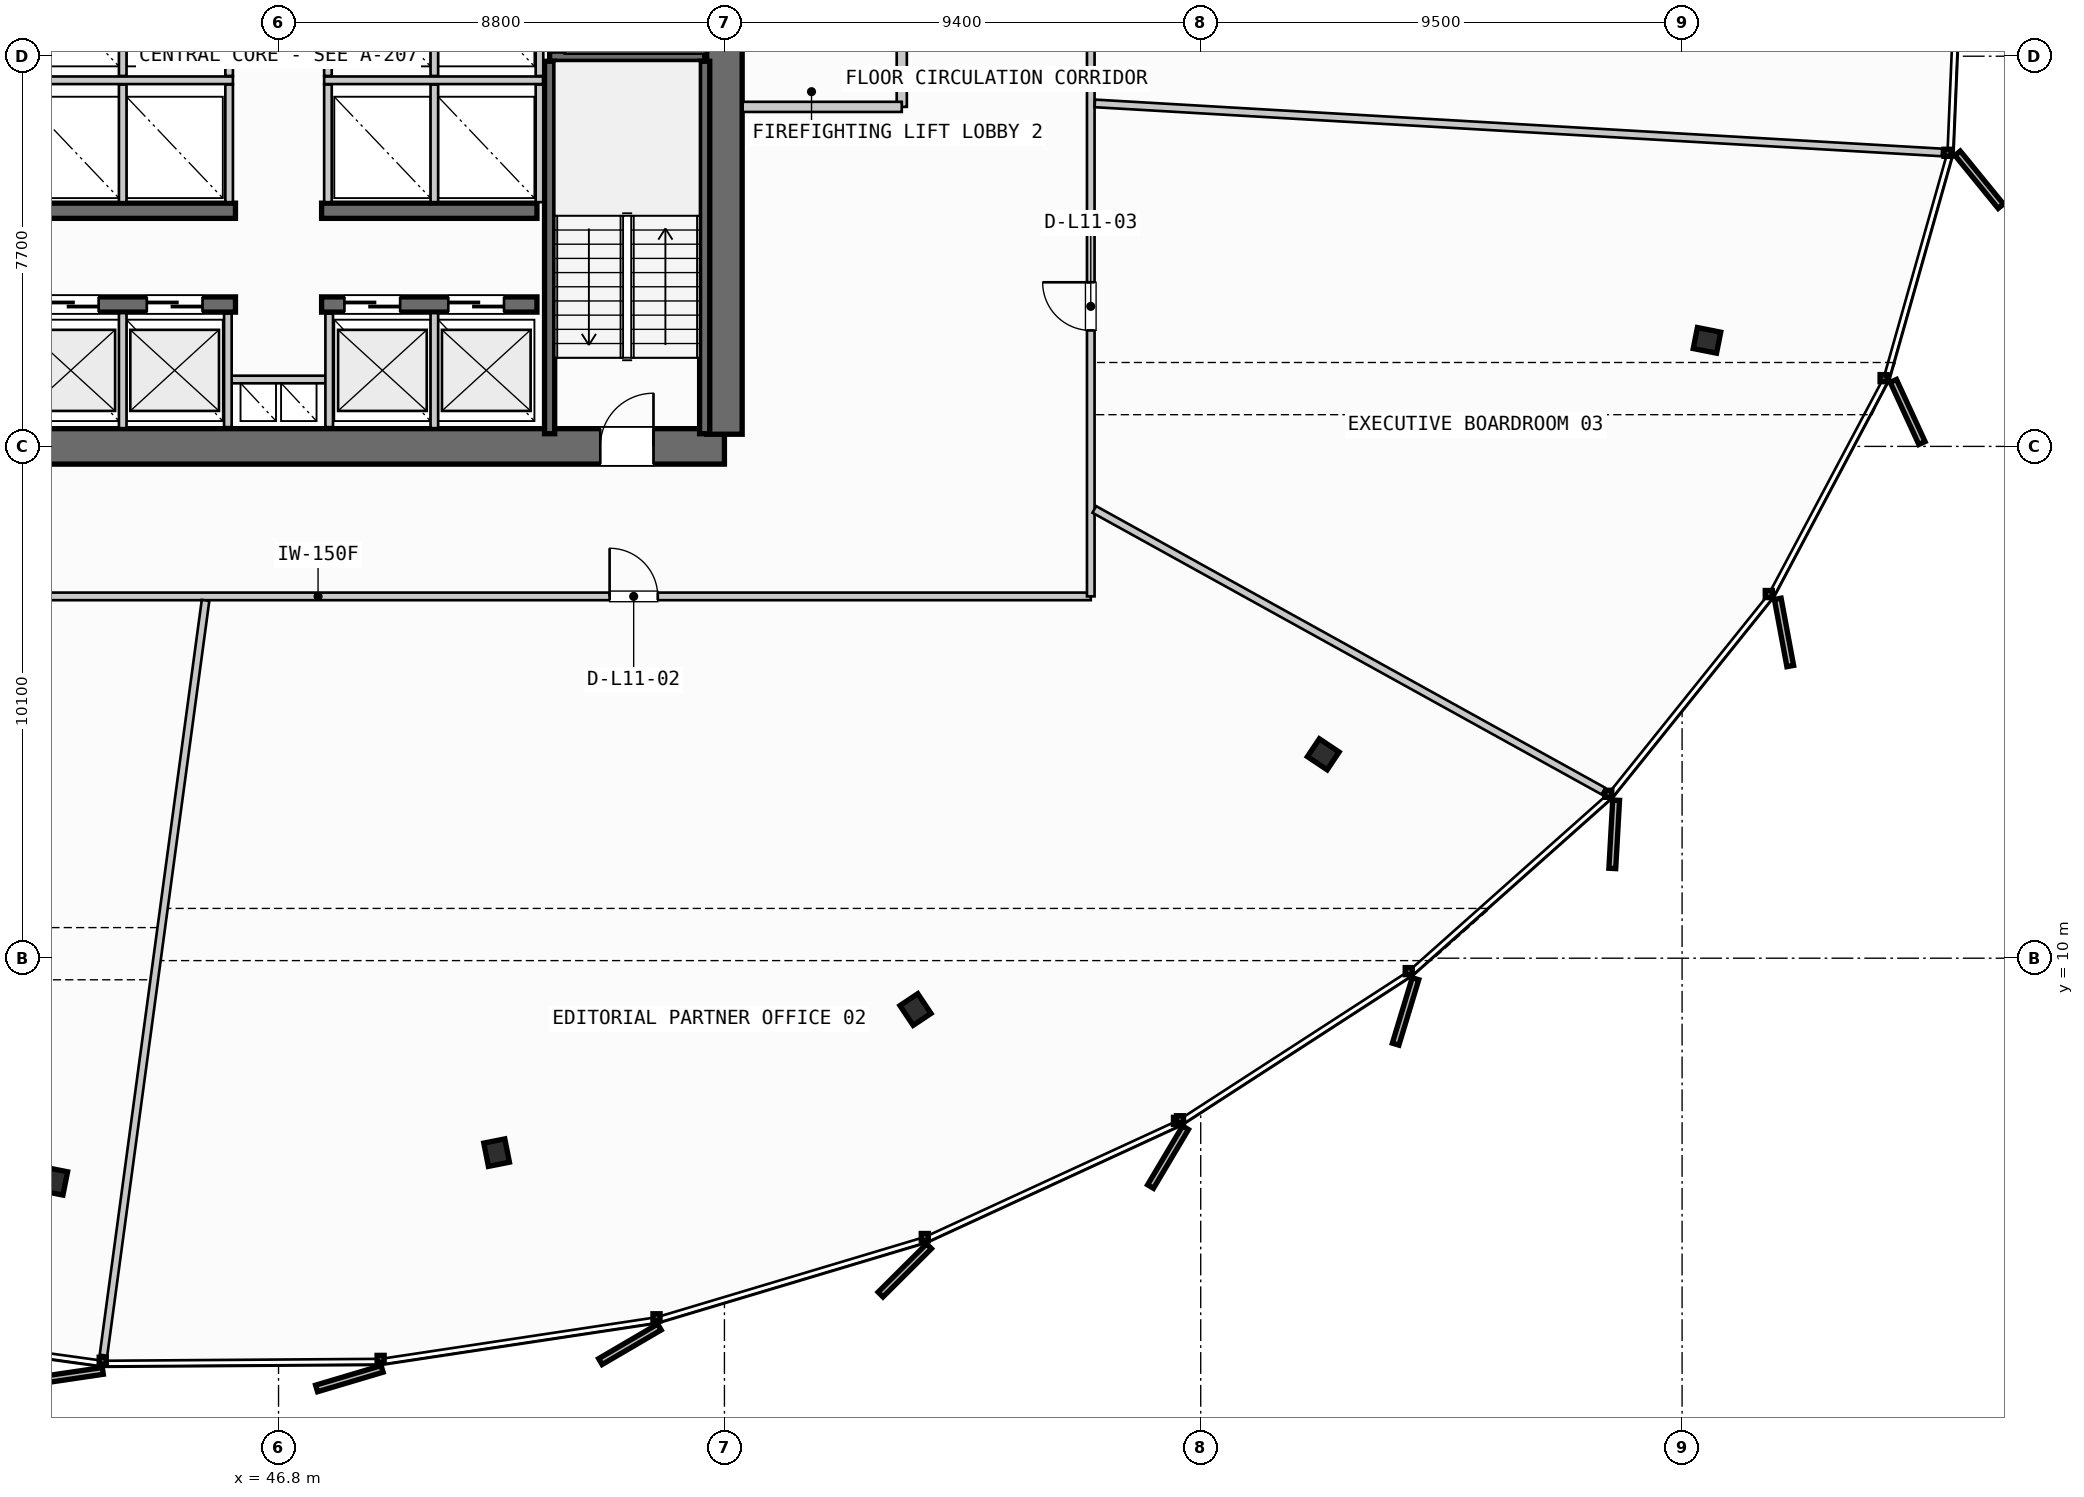
"""IFC4 building model, lengths in metres.
Left out: names, types, materials, properties, quantities, classifications, styles, units other than length and angle.
Written with IfcOpenShell. Run it as: python <this file> out.ifc"""

import sys

from ifc_helpers import new_model, si_unit, direction, frame, frame_2d, origin, origin_2d, place, context, subcontext, project, spatial, rectangle, i_section, extrude, source, transform, mapped, element, fill, save


model = new_model("IFC4")
c1 = context("Model", 3, precision=1e-05, world=origin(), true_north=direction((0.0, 1.0)))
c2 = subcontext(c1, "Body", "Model", "MODEL_VIEW")
j1 = project(units=[si_unit("LENGTHUNIT", "METRE"), si_unit("PLANEANGLEUNIT", "RADIAN")], contexts=[c1])
p1 = place(None, origin())
s1 = spatial("IfcSite", under=j1, at=p1, CompositionType="ELEMENT")
p2 = place(p1, origin())
s2 = spatial("IfcBuilding", under=s1, at=p2, CompositionType="ELEMENT")
p3 = place(p2, frame((0.0, 0.0, 48.6)))
s3 = spatial("IfcBuildingStorey", under=s2, at=p3, CompositionType="ELEMENT", Elevation=48.6)
p4 = place(p3, frame((38.0, 20.1, 0.0), z_axis=(0.0, 0.0, 1.0), x_axis=(1.0, 0.0, 0.0)))
e1 = element("IfcWall", 1, at=p4, inside=s3, PredefinedType="SHEAR", context=c2, shape_type="SweptSolid", body=[
    extrude(rectangle(XDim=17.6, YDim=0.7, at=frame_2d((8.8, 0.0))), origin(), (0.0, 0.0, 1.0), 3.55),
])
p5 = place(p4, frame((1.4, 0.0, 0.0)))
e2 = element("IfcOpeningElement", 2, at=p5, cuts=e1, PredefinedType="OPENING", context=c2, shape_type="SweptSolid", body=[
    extrude(rectangle(XDim=1.05, YDim=2.15, at=frame_2d((0.525, 1.075))), frame((0.0, 0.36, 0.0), z_axis=(0.0, -1.0, 0.0), x_axis=(1.0, 0.0, 0.0)), (0.0, 0.0, 1.0), 0.72),
])
p6 = place(p4, frame((15.15, 0.0, 0.0)))
e3 = element("IfcOpeningElement", 3, at=p6, cuts=e1, PredefinedType="OPENING", context=c2, shape_type="SweptSolid", body=[
    extrude(rectangle(XDim=1.05, YDim=2.15, at=frame_2d((0.525, 1.075))), frame((0.0, 0.36, 0.0), z_axis=(0.0, -1.0, 0.0), x_axis=(1.0, 0.0, 0.0)), (0.0, 0.0, 1.0), 0.72),
])
p7 = place(p3, frame((55.6, 20.34, 0.0), z_axis=(0.0, 0.0, 1.0), x_axis=(0.0, 1.0, 0.0)))
e4 = element("IfcWall", 4, at=p7, inside=s3, PredefinedType="SHEAR", context=c2, shape_type="SweptSolid", body=[
    extrude(rectangle(XDim=14.92, YDim=0.7, at=frame_2d((7.46, 0.0))), origin(), (0.0, 0.0, 1.0), 3.55),
])
p8 = place(p7, frame((12.71, 0.0, 0.0)))
e5 = element("IfcOpeningElement", 5, at=p8, cuts=e4, PredefinedType="OPENING", context=c2, shape_type="SweptSolid", body=[
    extrude(rectangle(XDim=1.05, YDim=2.15, at=frame_2d((0.525, 1.075))), frame((0.0, 0.36, 0.0), z_axis=(0.0, -1.0, 0.0), x_axis=(1.0, 0.0, 0.0)), (0.0, 0.0, 1.0), 0.72),
])
p9 = place(p7, frame((8.61, 0.0, 0.0)))
e6 = element("IfcOpeningElement", 6, at=p9, cuts=e4, PredefinedType="OPENING", context=c2, shape_type="SweptSolid", body=[
    extrude(rectangle(XDim=1.1, YDim=2.2, at=frame_2d((0.55, 1.1))), frame((0.0, 0.36, 0.0), z_axis=(0.0, -1.0, 0.0), x_axis=(1.0, 0.0, 0.0)), (0.0, 0.0, 1.0), 0.72),
])
p10 = place(p3, frame((41.7, 22.9, 0.0), z_axis=(0.0, 0.0, 1.0), x_axis=(1.0, 0.0, 0.0)))
e7 = element("IfcWall", 7, at=p10, inside=s3, PredefinedType="SHEAR", context=c2, shape_type="SweptSolid", body=[
    extrude(rectangle(XDim=4.25, YDim=0.3, at=frame_2d((2.125, 0.0))), origin(), (0.0, 0.0, 1.0), 3.55),
])
p11 = place(p10, frame((0.45, 0.0, 0.0)))
e8 = element("IfcOpeningElement", 8, at=p11, cuts=e7, PredefinedType="OPENING", context=c2, shape_type="SweptSolid", body=[
    extrude(rectangle(XDim=1.1, YDim=2.2, at=frame_2d((0.55, 1.1))), frame((0.0, 0.16, 0.0), z_axis=(0.0, -1.0, 0.0), x_axis=(1.0, 0.0, 0.0)), (0.0, 0.0, 1.0), 0.32),
])
p12 = place(p10, frame((2.5, 0.0, 0.0)))
e9 = element("IfcOpeningElement", 9, at=p12, cuts=e7, PredefinedType="OPENING", context=c2, shape_type="SweptSolid", body=[
    extrude(rectangle(XDim=1.1, YDim=2.2, at=frame_2d((0.55, 1.1))), frame((0.0, 0.16, 0.0), z_axis=(0.0, -1.0, 0.0), x_axis=(1.0, 0.0, 0.0)), (0.0, 0.0, 1.0), 0.32),
])
p13 = place(p3, frame((47.65, 22.9, 0.0), z_axis=(0.0, 0.0, 1.0), x_axis=(1.0, 0.0, 0.0)))
e10 = element("IfcWall", 10, at=p13, inside=s3, PredefinedType="SHEAR", context=c2, shape_type="SweptSolid", body=[
    extrude(rectangle(XDim=4.25, YDim=0.3, at=frame_2d((2.125, 0.0))), origin(), (0.0, 0.0, 1.0), 3.55),
])
p14 = place(p13, frame((0.45, 0.0, 0.0)))
e11 = element("IfcOpeningElement", 11, at=p14, cuts=e10, PredefinedType="OPENING", context=c2, shape_type="SweptSolid", body=[
    extrude(rectangle(XDim=1.1, YDim=2.2, at=frame_2d((0.55, 1.1))), frame((0.0, 0.16, 0.0), z_axis=(0.0, -1.0, 0.0), x_axis=(1.0, 0.0, 0.0)), (0.0, 0.0, 1.0), 0.32),
])
p15 = place(p13, frame((2.5, 0.0, 0.0)))
e12 = element("IfcOpeningElement", 12, at=p15, cuts=e10, PredefinedType="OPENING", context=c2, shape_type="SweptSolid", body=[
    extrude(rectangle(XDim=1.1, YDim=2.2, at=frame_2d((0.55, 1.1))), frame((0.0, 0.16, 0.0), z_axis=(0.0, -1.0, 0.0), x_axis=(1.0, 0.0, 0.0)), (0.0, 0.0, 1.0), 0.32),
])
for number, where, z_axis, x_axis in (
    (13, (41.7, 24.75, 0.0), (0.0, 0.0, 1.0), (1.0, 0.0, 0.0)),
    (14, (47.65, 24.75, 0.0), (0.0, 0.0, 1.0), (1.0, 0.0, 0.0)),
):
    element("IfcWall", number, at=place(p3, frame(where, z_axis=z_axis, x_axis=x_axis)), inside=s3, PredefinedType="SHEAR", context=c2, shape_type="SweptSolid", body=[
        extrude(rectangle(XDim=4.25, YDim=0.3, at=frame_2d((2.125, 0.0))), origin(), (0.0, 0.0, 1.0), 3.55),
    ])
m1 = source(origin(), c2, "Body", "SweptSolid", [
    extrude(i_section(OverallWidth=0.423, OverallDepth=0.469, WebThickness=0.051, FlangeThickness=0.081, FilletRadius=0.015, at=origin_2d()), origin(), (0.0, 0.0, 1.0), 3.55),
])
for number, where, z_axis, x_axis in (
    (15, (42.383, 5.596, 0.0), (0.0, 0.0, 1.0), (-0.195, -0.981, 0.0)),
    (16, (51.104, 6.163, 0.0), (0.0, 0.0, 1.0), (0.195, -0.981, 0.0)),
    (17, (59.37, 8.987, 0.0), (0.0, 0.0, 1.0), (0.556, -0.831, 0.0)),
    (18, (67.418, 14.023, 0.0), (0.0, 0.0, 1.0), (0.831, -0.556, 0.0)),
    (19, (74.991, 22.192, 0.0), (0.0, 0.0, 1.0), (0.981, -0.195, 0.0)),
):
    element("IfcColumn", number, at=place(p3, frame(where, z_axis=z_axis, x_axis=x_axis)), inside=s3, PredefinedType="COLUMN", context=c2, shape_type="MappedRepresentation", body=[
        mapped(m1, transform((0.0, 0.0, 0.0), scale=1.0)),
    ])
p16 = place(p3, frame((52.15, 27.8, 0.0), z_axis=(0.0, 0.0, 1.0), x_axis=(1.0, 0.0, 0.0)))
e20 = element("IfcWall", 20, at=p16, inside=s3, PredefinedType="SHEAR", context=c2, shape_type="SweptSolid", body=[
    extrude(rectangle(XDim=3.06, YDim=0.2, at=frame_2d((1.53, 0.0))), origin(), (0.0, 0.0, 1.0), 3.55),
])
for number, where, z_axis, x_axis in (
    (21, (55.21, 27.7, 0.0), (0.0, 0.0, 1.0), (0.0, -1.0, 0.0)),
    (22, (52.15, 20.35, 0.0), (0.0, 0.0, 1.0), (0.0, 1.0, 0.0)),
):
    element("IfcWall", number, at=place(p3, frame(where, z_axis=z_axis, x_axis=x_axis)), inside=s3, PredefinedType="SHEAR", context=c2, shape_type="SweptSolid", body=[
        extrude(rectangle(XDim=7.35, YDim=0.2, at=frame_2d((3.675, 0.0))), origin(), (0.0, 0.0, 1.0), 3.55),
    ])
p17 = place(p3, frame((45.8, 21.42, 0.0), z_axis=(0.0, 0.0, 1.0), x_axis=(1.0, 0.0, 0.0)))
e23 = element("IfcWall", 23, at=p17, inside=s3, PredefinedType="PARTITIONING", context=c2, shape_type="SweptSolid", body=[
    extrude(rectangle(XDim=2.0, YDim=0.15, at=frame_2d((1.0, 0.0))), origin(), (0.0, 0.0, 1.0), 2.785),
])
for number, where, z_axis, x_axis in (
    (24, (45.8, 20.48, 0.0), (0.0, 0.0, 1.0), (0.0, 1.0, 0.0)),
    (25, (47.8, 20.48, 0.0), (0.0, 0.0, 1.0), (0.0, 1.0, 0.0)),
):
    element("IfcWall", number, at=place(p3, frame(where, z_axis=z_axis, x_axis=x_axis)), inside=s3, PredefinedType="PARTITIONING", context=c2, shape_type="SweptSolid", body=[
        extrude(rectangle(XDim=2.24, YDim=0.15, at=frame_2d((1.12, 0.0))), origin(), (0.0, 0.0, 1.0), 2.785),
    ])
p18 = place(p3, frame((52.45, 27.95, 0.0), z_axis=(0.0, 0.0, 1.0), x_axis=(1.0, 0.0, 0.0)))
e26 = element("IfcWall", 26, at=p18, inside=s3, PredefinedType="PARTITIONING", context=c2, shape_type="SweptSolid", body=[
    extrude(rectangle(XDim=2.79, YDim=0.2, at=frame_2d((1.395, 0.0))), origin(), (0.0, 0.0, 1.0), 2.785),
])
p19 = place(p3, frame((59.1, 26.8, 0.0), z_axis=(0.0, 0.0, 1.0), x_axis=(0.0, 1.0, 0.0)))
e27 = element("IfcWall", 27, at=p19, inside=s3, PredefinedType="PARTITIONING", context=c2, shape_type="SweptSolid", body=[
    extrude(rectangle(XDim=4.4, YDim=0.2, at=frame_2d((2.2, 0.0))), origin(), (0.0, 0.0, 1.0), 2.785),
])
p20 = place(p19, frame((1.65, 0.0, 0.0)))
e28 = element("IfcOpeningElement", 28, at=p20, cuts=e27, PredefinedType="OPENING", context=c2, shape_type="SweptSolid", body=[
    extrude(rectangle(XDim=1.05, YDim=2.15, at=frame_2d((0.525, 1.075))), frame((0.0, 0.11, 0.0), z_axis=(0.0, -1.0, 0.0), x_axis=(1.0, 0.0, 0.0)), (0.0, 0.0, 1.0), 0.22),
])
p21 = place(p3, frame((55.96, 26.8, 0.0), z_axis=(0.0, 0.0, 1.0), x_axis=(1.0, 0.0, 0.0)))
e29 = element("IfcWall", 29, at=p21, inside=s3, PredefinedType="PARTITIONING", context=c2, shape_type="SweptSolid", body=[
    extrude(rectangle(XDim=3.14, YDim=0.2, at=frame_2d((1.57, 0.0))), origin(), (0.0, 0.0, 1.0), 2.785),
])
for number, where, z_axis, x_axis in (
    (30, (43.725, 20.46, 0.0), (0.0, 0.0, 1.0), (0.0, 1.0, 0.0)),
    (31, (49.875, 20.46, 0.0), (0.0, 0.0, 1.0), (0.0, 1.0, 0.0)),
):
    element("IfcWall", number, at=place(p3, frame(where, z_axis=z_axis, x_axis=x_axis)), inside=s3, PredefinedType="PARTITIONING", context=c2, shape_type="SweptSolid", body=[
        extrude(rectangle(XDim=2.27, YDim=0.15, at=frame_2d((1.135, 0.0))), origin(), (0.0, 0.0, 1.0), 2.785),
    ])
p22 = place(p3, frame((41.58, 27.325, 0.0), z_axis=(0.0, 0.0, 1.0), x_axis=(1.0, 0.0, 0.0)))
e32 = element("IfcWall", 32, at=p22, inside=s3, PredefinedType="PARTITIONING", context=c2, shape_type="SweptSolid", body=[
    extrude(rectangle(XDim=4.32, YDim=0.15, at=frame_2d((2.16, 0.0))), origin(), (0.0, 0.0, 1.0), 2.785),
])
p23 = place(p3, frame((47.7, 27.325, 0.0), z_axis=(0.0, 0.0, 1.0), x_axis=(1.0, 0.0, 0.0)))
e33 = element("IfcWall", 33, at=p23, inside=s3, PredefinedType="PARTITIONING", context=c2, shape_type="SweptSolid", body=[
    extrude(rectangle(XDim=4.32, YDim=0.15, at=frame_2d((2.16, 0.0))), origin(), (0.0, 0.0, 1.0), 2.785),
])
for number, where, z_axis, x_axis in (
    (34, (43.725, 24.92, 0.0), (0.0, 0.0, 1.0), (0.0, 1.0, 0.0)),
    (35, (45.825, 24.92, 0.0), (0.0, 0.0, 1.0), (0.0, 1.0, 0.0)),
    (36, (47.775, 24.92, 0.0), (0.0, 0.0, 1.0), (0.0, 1.0, 0.0)),
    (37, (49.875, 24.92, 0.0), (0.0, 0.0, 1.0), (0.0, 1.0, 0.0)),
    (38, (51.95, 24.92, 0.0), (0.0, 0.0, 1.0), (0.0, 1.0, 0.0)),
):
    element("IfcWall", number, at=place(p3, frame(where, z_axis=z_axis, x_axis=x_axis)), inside=s3, PredefinedType="PARTITIONING", context=c2, shape_type="SweptSolid", body=[
        extrude(rectangle(XDim=2.32, YDim=0.15, at=frame_2d((1.16, 0.0))), origin(), (0.0, 0.0, 1.0), 2.785),
    ])
for number, where, z_axis, x_axis in (
    (39, (43.725, 27.41, 0.0), (0.0, 0.0, 1.0), (0.0, 1.0, 0.0)),
    (40, (45.825, 27.41, 0.0), (0.0, 0.0, 1.0), (0.0, 1.0, 0.0)),
    (41, (47.775, 27.41, 0.0), (0.0, 0.0, 1.0), (0.0, 1.0, 0.0)),
    (42, (49.875, 27.41, 0.0), (0.0, 0.0, 1.0), (0.0, 1.0, 0.0)),
    (43, (51.95, 27.41, 0.0), (0.0, 0.0, 1.0), (0.0, 1.0, 0.0)),
):
    element("IfcWall", number, at=place(p3, frame(where, z_axis=z_axis, x_axis=x_axis)), inside=s3, PredefinedType="PARTITIONING", context=c2, shape_type="SweptSolid", body=[
        extrude(rectangle(XDim=2.27, YDim=0.15, at=frame_2d((1.135, 0.0))), origin(), (0.0, 0.0, 1.0), 2.785),
    ])
p24 = place(p3, frame((32.33, 17.14, 0.0), z_axis=(0.0, 0.0, 1.0), x_axis=(1.0, 0.0, 0.0)))
e44 = element("IfcWall", 44, at=p24, inside=s3, PredefinedType="PARTITIONING", context=c2, shape_type="SweptSolid", body=[
    extrude(rectangle(XDim=30.5, YDim=0.15, at=frame_2d((15.25, 0.0))), origin(), (0.0, 0.0, 1.0), 2.785),
])
p25 = place(p24, frame((6.621, 0.0, 0.0)))
e45 = element("IfcOpeningElement", 45, at=p25, cuts=e44, PredefinedType="OPENING", context=c2, shape_type="SweptSolid", body=[
    extrude(rectangle(XDim=0.95, YDim=2.15, at=frame_2d((0.475, 1.075))), frame((0.0, 0.085, 0.0), z_axis=(0.0, -1.0, 0.0), x_axis=(1.0, 0.0, 0.0)), (0.0, 0.0, 1.0), 0.17),
])
p26 = place(p24, frame((21.004, 0.0, 0.0)))
e46 = element("IfcOpeningElement", 46, at=p26, cuts=e44, PredefinedType="OPENING", context=c2, shape_type="SweptSolid", body=[
    extrude(rectangle(XDim=0.95, YDim=2.15, at=frame_2d((0.475, 1.075))), frame((0.0, 0.085, 0.0), z_axis=(0.0, -1.0, 0.0), x_axis=(1.0, 0.0, 0.0)), (0.0, 0.0, 1.0), 0.17),
])
p27 = place(p3, frame((62.83, 17.14, 0.0), z_axis=(0.0, 0.0, 1.0), x_axis=(0.0, 1.0, 0.0)))
e47 = element("IfcWall", 47, at=p27, inside=s3, PredefinedType="PARTITIONING", context=c2, shape_type="SweptSolid", body=[
    extrude(rectangle(XDim=20.48, YDim=0.15, at=frame_2d((10.24, 0.0))), origin(), (0.0, 0.0, 1.0), 2.785),
])
p28 = place(p27, frame((5.249, 0.0, 0.0)))
e48 = element("IfcOpeningElement", 48, at=p28, cuts=e47, PredefinedType="OPENING", context=c2, shape_type="SweptSolid", body=[
    extrude(rectangle(XDim=0.95, YDim=2.15, at=frame_2d((0.475, 1.075))), frame((0.0, 0.085, 0.0), z_axis=(0.0, -1.0, 0.0), x_axis=(1.0, 0.0, 0.0)), (0.0, 0.0, 1.0), 0.17),
])
p29 = place(p27, frame((14.161, 0.0, 0.0)))
e49 = element("IfcOpeningElement", 49, at=p29, cuts=e47, PredefinedType="OPENING", context=c2, shape_type="SweptSolid", body=[
    extrude(rectangle(XDim=0.95, YDim=2.15, at=frame_2d((0.475, 1.075))), frame((0.0, 0.085, 0.0), z_axis=(0.0, -1.0, 0.0), x_axis=(1.0, 0.0, 0.0)), (0.0, 0.0, 1.0), 0.17),
])
p30 = place(p3, frame((45.36, 17.061, 0.0), z_axis=(0.0, 0.0, 1.0), x_axis=(-0.134025236221, -0.990977919056, 0.0)))
e50 = element("IfcWall", 50, at=p30, inside=s3, PredefinedType="PARTITIONING", context=c2, shape_type="SweptSolid", body=[
    extrude(rectangle(XDim=15.032, YDim=0.15, at=frame_2d((7.516, 0.0))), origin(), (0.0, 0.0, 1.0), 2.785),
])
p31 = place(p3, frame((62.9, 18.856, 0.0), z_axis=(0.0, 0.0, 1.0), x_axis=(0.875005487699, -0.484112999719, 0.0)))
e51 = element("IfcWall", 51, at=p31, inside=s3, PredefinedType="PARTITIONING", context=c2, shape_type="SweptSolid", body=[
    extrude(rectangle(XDim=11.481, YDim=0.15, at=frame_2d((5.741, 0.0))), origin(), (0.0, 0.0, 1.0), 2.785),
])
p32 = place(p3, frame((62.91, 26.869, 0.0), z_axis=(0.0, 0.0, 1.0), x_axis=(0.998327003438, -0.057820361518, 0.0)))
e52 = element("IfcWall", 52, at=p32, inside=s3, PredefinedType="PARTITIONING", context=c2, shape_type="SweptSolid", body=[
    extrude(rectangle(XDim=16.746, YDim=0.15, at=frame_2d((8.373, 0.0))), origin(), (0.0, 0.0, 1.0), 2.785),
])
m2 = source(origin(), c2, "Body", "SweptSolid", [
    extrude(rectangle(XDim=1.05, YDim=2.15, at=frame_2d((0.525, 1.075))), frame((0.0, 0.025, 0.0), z_axis=(0.0, -1.0, 0.0), x_axis=(1.0, 0.0, 0.0)), (0.0, 0.0, 1.0), 0.05),
])
p33 = place(p6, origin())
e53 = element("IfcDoor", 53, at=p33, inside=s3, OperationType="SINGLE_SWING_RIGHT", PredefinedType="DOOR", context=c2, shape_type="MappedRepresentation", body=[
    mapped(m2, transform((0.0, 0.0, 0.0), scale=1.0)),
])
fill(e3, e53)
m3 = source(origin(), c2, "Body", "SweptSolid", [
    extrude(rectangle(XDim=1.1, YDim=2.2, at=frame_2d((0.55, 1.1))), frame((0.0, 0.025, 0.0), z_axis=(0.0, -1.0, 0.0), x_axis=(1.0, 0.0, 0.0)), (0.0, 0.0, 1.0), 0.05),
])
p34 = place(p11, origin())
e54 = element("IfcDoor", 54, at=p34, inside=s3, OperationType="SLIDING_TO_LEFT", PredefinedType="DOOR", context=c2, shape_type="MappedRepresentation", body=[
    mapped(m3, transform((0.0, 0.0, 0.0), scale=1.0)),
])
fill(e8, e54)
p35 = place(p12, origin())
e55 = element("IfcDoor", 55, at=p35, inside=s3, OperationType="SLIDING_TO_LEFT", PredefinedType="DOOR", context=c2, shape_type="MappedRepresentation", body=[
    mapped(m3, transform((0.0, 0.0, 0.0), scale=1.0)),
])
fill(e9, e55)
p36 = place(p14, origin())
e56 = element("IfcDoor", 56, at=p36, inside=s3, OperationType="SLIDING_TO_LEFT", PredefinedType="DOOR", context=c2, shape_type="MappedRepresentation", body=[
    mapped(m3, transform((0.0, 0.0, 0.0), scale=1.0)),
])
fill(e11, e56)
p37 = place(p15, origin())
e57 = element("IfcDoor", 57, at=p37, inside=s3, OperationType="SLIDING_TO_LEFT", PredefinedType="DOOR", context=c2, shape_type="MappedRepresentation", body=[
    mapped(m3, transform((0.0, 0.0, 0.0), scale=1.0)),
])
fill(e12, e57)
m4 = source(origin(), c2, "Body", "SweptSolid", [
    extrude(rectangle(XDim=0.95, YDim=2.15, at=frame_2d((0.475, 1.075))), frame((0.0, 0.025, 0.0), z_axis=(0.0, -1.0, 0.0), x_axis=(1.0, 0.0, 0.0)), (0.0, 0.0, 1.0), 0.05),
])
p38 = place(p26, origin())
e58 = element("IfcDoor", 58, at=p38, inside=s3, OperationType="SINGLE_SWING_LEFT", PredefinedType="DOOR", context=c2, shape_type="MappedRepresentation", body=[
    mapped(m4, transform((0.0, 0.0, 0.0), scale=1.0)),
])
fill(e46, e58)
p39 = place(p28, origin())
e59 = element("IfcDoor", 59, at=p39, inside=s3, OperationType="SINGLE_SWING_RIGHT", PredefinedType="DOOR", context=c2, shape_type="MappedRepresentation", body=[
    mapped(m4, transform((0.0, 0.0, 0.0), scale=1.0)),
])
fill(e48, e59)
save(model, sys.argv[1])
